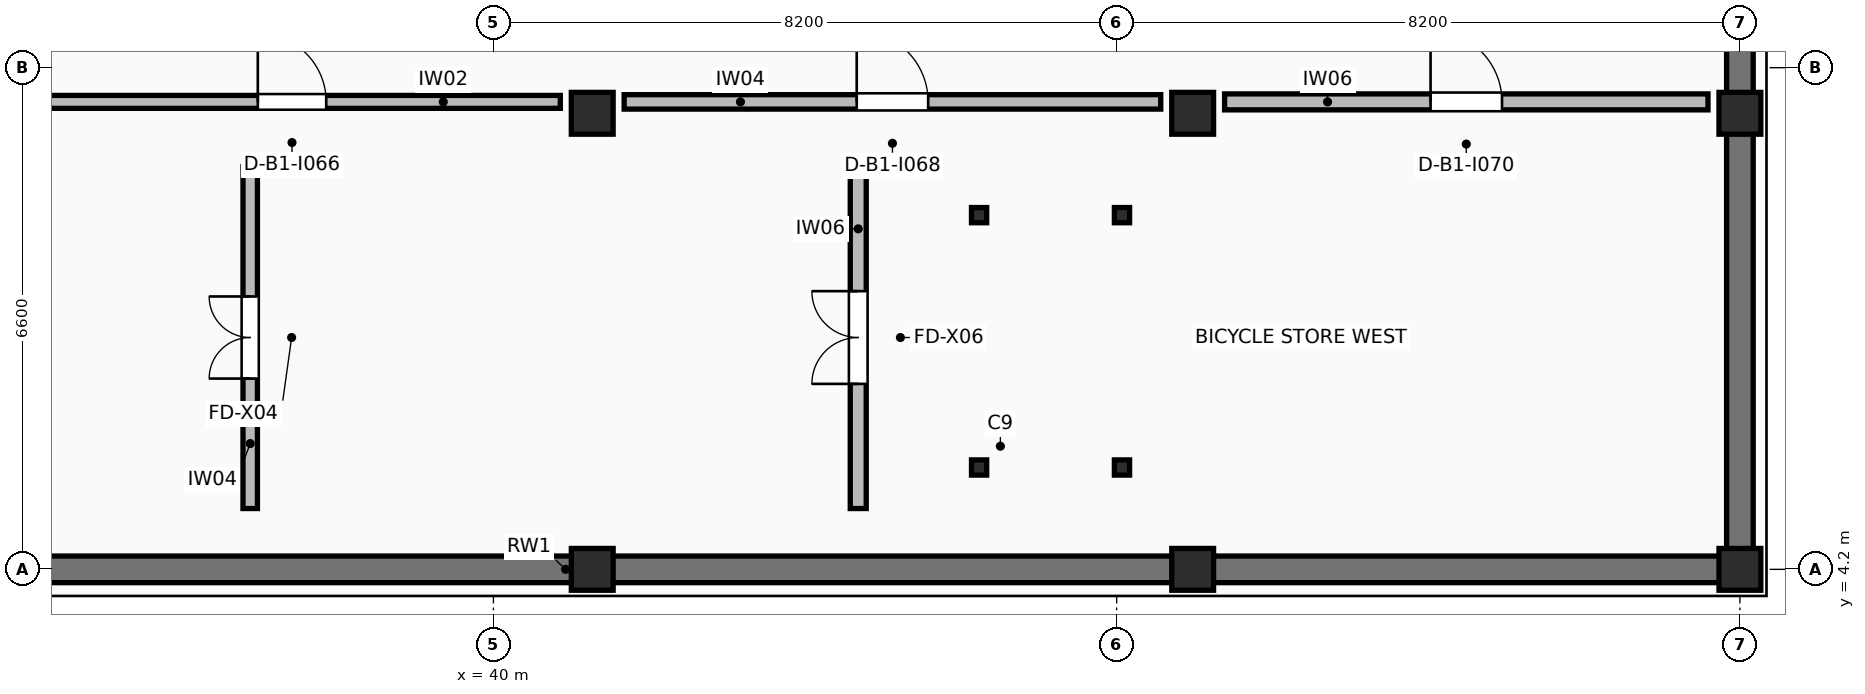
"""IFC4 building model, lengths in metres.
Left out: names, types, materials, properties, quantities, classifications, styles, units other than length and angle.
Written with IfcOpenShell. Run it as: python <this file> out.ifc"""

import sys

from ifc_helpers import new_model, si_unit, direction, frame, frame_2d, origin, origin_2d, place, context, subcontext, project, spatial, rectangle, hollow_rectangle, extrude, element, fill, save


model = new_model("IFC4")
c1 = context("Model", 3, precision=1e-05, world=origin(), true_north=direction((0.0, 1.0)))
c2 = subcontext(c1, "Body", "Model", "MODEL_VIEW")
j1 = project(units=[si_unit("LENGTHUNIT", "METRE"), si_unit("PLANEANGLEUNIT", "RADIAN")], contexts=[c1])
p1 = place(None, origin())
s1 = spatial("IfcSite", under=j1, at=p1, CompositionType="ELEMENT")
p2 = place(p1, origin())
s2 = spatial("IfcBuilding", under=s1, at=p2, CompositionType="ELEMENT")
p3 = place(p2, frame((0.0, 0.0, -4.08)))
s3 = spatial("IfcBuildingStorey", under=s2, at=p3, CompositionType="ELEMENT", Elevation=-4.08)
for number, where, z_axis, x_axis in (
    (1, (41.3, 4.2, 0.0), (0.0, 0.0, 1.0), (1.0, 0.0, 0.0)),
    (2, (41.3, 10.2, 0.0), (0.0, 0.0, 1.0), (1.0, 0.0, 0.0)),
    (3, (49.2, 4.2, 0.0), (0.0, 0.0, 1.0), (1.0, 0.0, 0.0)),
    (4, (49.2, 10.2, 0.0), (0.0, 0.0, 1.0), (1.0, 0.0, 0.0)),
    (5, (56.4, 4.2, 0.0), (0.0, 0.0, 1.0), (1.0, 0.0, 0.0)),
    (6, (56.4, 10.2, 0.0), (0.0, 0.0, 1.0), (1.0, 0.0, 0.0)),
):
    element("IfcColumn", number, at=place(p3, frame(where, z_axis=z_axis, x_axis=x_axis)), inside=s3, PredefinedType="COLUMN", context=c2, shape_type="SweptSolid", body=[
        extrude(rectangle(XDim=0.55, YDim=0.55, at=origin_2d()), origin(), (0.0, 0.0, 1.0), 4.08),
    ])
p4 = place(p3, frame((25.325, 4.2, 0.0), z_axis=(0.0, 0.0, 1.0), x_axis=(1.0, 0.0, 0.0)))
e7 = element("IfcWall", 7, at=p4, inside=s3, PredefinedType="USERDEFINED", context=c2, shape_type="SweptSolid", body=[
    extrude(rectangle(XDim=31.25, YDim=0.35, at=frame_2d((15.625, 0.0))), origin(), (0.0, 0.0, 1.0), 3.065),
])
p5 = place(p3, frame((56.4, 4.375, 0.0), z_axis=(0.0, 0.0, 1.0), x_axis=(0.0, 1.0, 0.0)))
e8 = element("IfcWall", 8, at=p5, inside=s3, PredefinedType="USERDEFINED", context=c2, shape_type="SweptSolid", body=[
    extrude(rectangle(XDim=16.45, YDim=0.35, at=frame_2d((8.225, 0.0))), origin(), (0.0, 0.0, 1.0), 3.065),
])
for number, where, z_axis, x_axis in (
    (9, (46.39, 5.54, 0.0), (0.0, 0.0, 1.0), (1.0, 0.0, 0.0)),
    (10, (46.39, 8.86, 0.0), (0.0, 0.0, 1.0), (1.0, 0.0, 0.0)),
    (11, (48.27, 5.54, 0.0), (0.0, 0.0, 1.0), (1.0, 0.0, 0.0)),
    (12, (48.27, 8.86, 0.0), (0.0, 0.0, 1.0), (1.0, 0.0, 0.0)),
):
    element("IfcColumn", number, at=place(p3, frame(where, z_axis=z_axis, x_axis=x_axis)), inside=s3, PredefinedType="COLUMN", context=c2, shape_type="SweptSolid", body=[
        extrude(hollow_rectangle(XDim=0.2, YDim=0.2, WallThickness=0.01, InnerFilletRadius=0.01, OuterFilletRadius=0.02, at=origin_2d()), origin(), (0.0, 0.0, 1.0), 4.08),
    ])
p6 = place(p3, frame((36.8, 5.0, 0.0), z_axis=(0.0, 0.0, 1.0), x_axis=(0.0, 1.0, 0.0)))
e13 = element("IfcWall", 13, at=p6, inside=s3, PredefinedType="STANDARD", context=c2, shape_type="SweptSolid", body=[
    extrude(rectangle(XDim=4.5, YDim=0.19, at=frame_2d((2.25, 0.0))), origin(), (0.0, 0.0, 1.0), 2.72),
])
p7 = place(p6, frame((1.71, 0.0, 0.0)))
e14 = element("IfcOpeningElement", 14, at=p7, cuts=e13, PredefinedType="OPENING", context=c2, shape_type="SweptSolid", body=[
    extrude(rectangle(XDim=1.08, YDim=2.16, at=frame_2d((0.54, 1.08))), frame((0.0, 0.105, 0.0), z_axis=(0.0, -1.0, 0.0), x_axis=(1.0, 0.0, 0.0)), (0.0, 0.0, 1.0), 0.21),
])
p8 = place(p3, frame((44.8, 5.0, 0.0), z_axis=(0.0, 0.0, 1.0), x_axis=(0.0, 1.0, 0.0)))
e15 = element("IfcWall", 15, at=p8, inside=s3, PredefinedType="STANDARD", context=c2, shape_type="SweptSolid", body=[
    extrude(rectangle(XDim=4.5, YDim=0.21, at=frame_2d((2.25, 0.0))), origin(), (0.0, 0.0, 1.0), 2.72),
])
p9 = place(p8, frame((1.64, 0.0, 0.0)))
e16 = element("IfcOpeningElement", 16, at=p9, cuts=e15, PredefinedType="OPENING", context=c2, shape_type="SweptSolid", body=[
    extrude(rectangle(XDim=1.22, YDim=2.18, at=frame_2d((0.61, 1.09))), frame((0.0, 0.115, 0.0), z_axis=(0.0, -1.0, 0.0), x_axis=(1.0, 0.0, 0.0)), (0.0, 0.0, 1.0), 0.23),
])
p10 = place(p3, frame((33.82, 10.35, 0.0), z_axis=(0.0, 0.0, 1.0), x_axis=(1.0, 0.0, 0.0)))
e17 = element("IfcWall", 17, at=p10, inside=s3, PredefinedType="STANDARD", context=c2, shape_type="SweptSolid", body=[
    extrude(rectangle(XDim=7.06, YDim=0.17, at=frame_2d((3.53, 0.0))), origin(), (0.0, 0.0, 1.0), 2.72),
])
p11 = place(p10, frame((3.08, 0.0, 0.0)))
e18 = element("IfcOpeningElement", 18, at=p11, cuts=e17, PredefinedType="OPENING", context=c2, shape_type="SweptSolid", body=[
    extrude(rectangle(XDim=0.9, YDim=2.18, at=frame_2d((0.45, 1.09))), frame((0.0, 0.095, 0.0), z_axis=(0.0, -1.0, 0.0), x_axis=(1.0, 0.0, 0.0)), (0.0, 0.0, 1.0), 0.19),
])
p12 = place(p3, frame((41.72, 10.35, 0.0), z_axis=(0.0, 0.0, 1.0), x_axis=(1.0, 0.0, 0.0)))
e19 = element("IfcWall", 19, at=p12, inside=s3, PredefinedType="STANDARD", context=c2, shape_type="SweptSolid", body=[
    extrude(rectangle(XDim=7.06, YDim=0.19, at=frame_2d((3.53, 0.0))), origin(), (0.0, 0.0, 1.0), 2.72),
])
p13 = place(p12, frame((3.06, 0.0, 0.0)))
e20 = element("IfcOpeningElement", 20, at=p13, cuts=e19, PredefinedType="OPENING", context=c2, shape_type="SweptSolid", body=[
    extrude(rectangle(XDim=0.94, YDim=2.06, at=frame_2d((0.47, 1.03))), frame((0.0, 0.105, 0.0), z_axis=(0.0, -1.0, 0.0), x_axis=(1.0, 0.0, 0.0)), (0.0, 0.0, 1.0), 0.21),
])
p14 = place(p3, frame((49.62, 10.35, 0.0), z_axis=(0.0, 0.0, 1.0), x_axis=(1.0, 0.0, 0.0)))
e21 = element("IfcWall", 21, at=p14, inside=s3, PredefinedType="STANDARD", context=c2, shape_type="SweptSolid", body=[
    extrude(rectangle(XDim=6.36, YDim=0.21, at=frame_2d((3.18, 0.0))), origin(), (0.0, 0.0, 1.0), 2.72),
])
p15 = place(p14, frame((2.71, 0.0, 0.0)))
e22 = element("IfcOpeningElement", 22, at=p15, cuts=e21, PredefinedType="OPENING", context=c2, shape_type="SweptSolid", body=[
    extrude(rectangle(XDim=0.94, YDim=2.18, at=frame_2d((0.47, 1.09))), frame((0.0, 0.115, 0.0), z_axis=(0.0, -1.0, 0.0), x_axis=(1.0, 0.0, 0.0)), (0.0, 0.0, 1.0), 0.23),
])
p16 = place(p7, frame((1.08, 0.0, 0.0), z_axis=(0.0, 0.0, 1.0), x_axis=(-1.0, 0.0, 0.0)))
e23 = element("IfcDoor", 23, at=p16, inside=s3, OperationType="DOUBLE_DOOR_SINGLE_SWING", PredefinedType="DOOR", context=c2, shape_type="SweptSolid", body=[
    extrude(rectangle(XDim=1.08, YDim=2.16, at=frame_2d((0.54, 1.08))), frame((0.0, 0.025, 0.0), z_axis=(0.0, -1.0, 0.0), x_axis=(1.0, 0.0, 0.0)), (0.0, 0.0, 1.0), 0.05),
])
fill(e14, e23)
p17 = place(p9, frame((1.22, 0.0, 0.0), z_axis=(0.0, 0.0, 1.0), x_axis=(-1.0, 0.0, 0.0)))
e24 = element("IfcDoor", 24, at=p17, inside=s3, OperationType="DOUBLE_DOOR_SINGLE_SWING", PredefinedType="DOOR", context=c2, shape_type="SweptSolid", body=[
    extrude(rectangle(XDim=1.22, YDim=2.18, at=frame_2d((0.61, 1.09))), frame((0.0, 0.025, 0.0), z_axis=(0.0, -1.0, 0.0), x_axis=(1.0, 0.0, 0.0)), (0.0, 0.0, 1.0), 0.05),
])
fill(e16, e24)
p18 = place(p11, origin())
e25 = element("IfcDoor", 25, at=p18, inside=s3, OperationType="SINGLE_SWING_LEFT", PredefinedType="DOOR", context=c2, shape_type="SweptSolid", body=[
    extrude(rectangle(XDim=0.9, YDim=2.18, at=frame_2d((0.45, 1.09))), frame((0.0, 0.025, 0.0), z_axis=(0.0, -1.0, 0.0), x_axis=(1.0, 0.0, 0.0)), (0.0, 0.0, 1.0), 0.05),
])
fill(e18, e25)
p19 = place(p13, origin())
e26 = element("IfcDoor", 26, at=p19, inside=s3, OperationType="SINGLE_SWING_LEFT", PredefinedType="DOOR", context=c2, shape_type="SweptSolid", body=[
    extrude(rectangle(XDim=0.94, YDim=2.06, at=frame_2d((0.47, 1.03))), frame((0.0, 0.025, 0.0), z_axis=(0.0, -1.0, 0.0), x_axis=(1.0, 0.0, 0.0)), (0.0, 0.0, 1.0), 0.05),
])
fill(e20, e26)
p20 = place(p15, origin())
e27 = element("IfcDoor", 27, at=p20, inside=s3, OperationType="SINGLE_SWING_LEFT", PredefinedType="DOOR", context=c2, shape_type="SweptSolid", body=[
    extrude(rectangle(XDim=0.94, YDim=2.18, at=frame_2d((0.47, 1.09))), frame((0.0, 0.025, 0.0), z_axis=(0.0, -1.0, 0.0), x_axis=(1.0, 0.0, 0.0)), (0.0, 0.0, 1.0), 0.05),
])
fill(e22, e27)
save(model, sys.argv[1])
